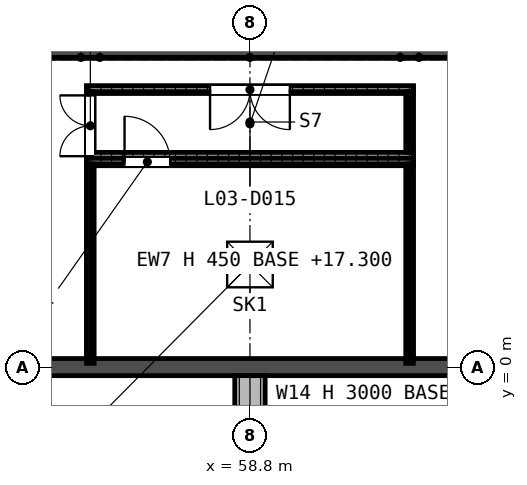
"""IFC4 building model, lengths in metres.
Left out: names, types, materials, properties, quantities, classifications, styles, units other than length and angle.
Written with IfcOpenShell. Run it as: python <this file> out.ifc"""

import sys

from ifc_helpers import new_model, si_unit, direction, frame, frame_2d, origin, origin_2d, place, context, subcontext, project, spatial, polyline, rectangle, outline, extrude, element, fill, save


model = new_model("IFC4")
c1 = context("Model", 3, precision=1e-05, world=origin(), true_north=direction((0.0, 1.0)))
c2 = subcontext(c1, "Body", "Model", "MODEL_VIEW")
j1 = project(units=[si_unit("LENGTHUNIT", "METRE"), si_unit("PLANEANGLEUNIT", "RADIAN")], contexts=[c1])
p1 = place(None, origin())
s1 = spatial("IfcSite", under=j1, at=p1, CompositionType="ELEMENT")
p2 = place(p1, origin())
s2 = spatial("IfcBuilding", under=s1, at=p2, CompositionType="ELEMENT")
p3 = place(p2, frame((0.0, 0.0, 14.4)))
s3 = spatial("IfcBuildingStorey", under=s2, at=p3, CompositionType="ELEMENT", Elevation=14.4)
p4 = place(p3, frame((0.0, 0.0, -0.3), z_axis=(0.0, 0.0, 1.0), x_axis=(1.0, 0.0, 0.0)))
e1 = element("IfcWall", 1, at=p4, inside=s3, PredefinedType="SOLIDWALL", context=c2, shape_type="SweptSolid", body=[
    extrude(rectangle(XDim=168.0, YDim=0.45, at=frame_2d((84.0, 0.0))), origin(), (0.0, 0.0, 1.0), 3.3),
])
p5 = place(p3, frame((42.0, 8.4, -0.3), z_axis=(0.0, 0.0, 1.0), x_axis=(1.0, 0.0, 0.0)))
e2 = element("IfcWall", 2, at=p5, inside=s3, PredefinedType="SHEAR", context=c2, shape_type="SweptSolid", body=[
    extrude(outline(polyline([(0.0, 0.0), (42.0, 0.0), (42.0, 0.05), (41.807, 0.05), (39.368, 3.65), (36.232, 3.65), (33.793, 0.05), (33.6, 0.05), (33.407, 0.05), (30.968, 3.65), (27.832, 3.65), (25.393, 0.05), (25.2, 0.05), (25.007, 0.05), (22.568, 3.65), (19.432, 3.65), (16.993, 0.05), (16.8, 0.05), (16.607, 0.05), (14.168, 3.65), (11.032, 3.65), (8.593, 0.05), (8.4, 0.05), (8.207, 0.05), (5.768, 3.65), (2.632, 3.65), (0.193, 0.05), (0.0, 0.05), (0.0, 0.0)])), frame((0.0, 0.25, 0.0), z_axis=(0.0, -1.0, 0.0), x_axis=(1.0, 0.0, 0.0)), (0.0, 0.0, 1.0), 0.5),
])
p6 = place(p3, frame((54.5, 5.4, -0.3), z_axis=(0.0, 0.0, 1.0), x_axis=(1.0, 0.0, 0.0)))
e3 = element("IfcWall", 3, at=p6, inside=s3, PredefinedType="SHEAR", context=c2, shape_type="SweptSolid", body=[
    extrude(rectangle(XDim=8.6, YDim=0.2, at=frame_2d((4.3, 0.0))), origin(), (0.0, 0.0, 1.0), 3.0),
])
p7 = place(p6, frame((1.0, 0.0, 0.3)))
e4 = element("IfcOpeningElement", 4, at=p7, cuts=e3, PredefinedType="OPENING", context=c2, shape_type="SweptSolid", body=[
    extrude(rectangle(XDim=1.2, YDim=2.2, at=frame_2d((0.6, 1.1))), frame((0.0, 0.11, 0.0), z_axis=(0.0, -1.0, 0.0), x_axis=(1.0, 0.0, 0.0)), (0.0, 0.0, 1.0), 0.22),
])
for number, where, z_axis, x_axis in (
    (5, (54.6, 0.1, -0.3), (0.0, 0.0, 1.0), (0.0, 1.0, 0.0)),
    (6, (63.0, 0.1, -0.3), (0.0, 0.0, 1.0), (0.0, 1.0, 0.0)),
):
    element("IfcWall", number, at=place(p3, frame(where, z_axis=z_axis, x_axis=x_axis)), inside=s3, PredefinedType="SHEAR", context=c2, shape_type="SweptSolid", body=[
        extrude(rectangle(XDim=5.2, YDim=0.2, at=frame_2d((2.6, 0.0))), origin(), (0.0, 0.0, 1.0), 3.0),
    ])
p8 = place(p3, frame((54.6, 5.4, -0.3), z_axis=(0.0, 0.0, 1.0), x_axis=(0.0, 1.0, 0.0)))
e7 = element("IfcWall", 7, at=p8, inside=s3, PredefinedType="SHEAR", context=c2, shape_type="SweptSolid", body=[
    extrude(rectangle(XDim=1.9, YDim=0.2, at=frame_2d((0.95, 0.0))), origin(), (0.0, 0.0, 1.0), 3.0),
])
p9 = place(p8, frame((0.15, 0.0, 0.3)))
e8 = element("IfcOpeningElement", 8, at=p9, cuts=e7, PredefinedType="OPENING", context=c2, shape_type="SweptSolid", body=[
    extrude(rectangle(XDim=1.6, YDim=2.2, at=frame_2d((0.8, 1.1))), frame((0.0, 0.11, 0.0), z_axis=(0.0, -1.0, 0.0), x_axis=(1.0, 0.0, 0.0)), (0.0, 0.0, 1.0), 0.22),
])
p10 = place(p3, frame((63.0, 5.4, -0.3), z_axis=(0.0, 0.0, 1.0), x_axis=(0.0, 1.0, 0.0)))
e9 = element("IfcWall", 9, at=p10, inside=s3, PredefinedType="SHEAR", context=c2, shape_type="SweptSolid", body=[
    extrude(rectangle(XDim=1.9, YDim=0.2, at=frame_2d((0.95, 0.0))), origin(), (0.0, 0.0, 1.0), 3.0),
])
p11 = place(p3, frame((54.5, 7.3, -0.3), z_axis=(0.0, 0.0, 1.0), x_axis=(1.0, 0.0, 0.0)))
e10 = element("IfcWall", 10, at=p11, inside=s3, PredefinedType="SHEAR", context=c2, shape_type="SweptSolid", body=[
    extrude(rectangle(XDim=8.6, YDim=0.2, at=frame_2d((4.3, 0.0))), origin(), (0.0, 0.0, 1.0), 3.0),
])
p12 = place(p11, frame((3.25, 0.0, 0.3)))
e11 = element("IfcOpeningElement", 11, at=p12, cuts=e10, PredefinedType="OPENING", context=c2, shape_type="SweptSolid", body=[
    extrude(rectangle(XDim=2.1, YDim=2.2, at=frame_2d((1.05, 1.1))), frame((0.0, 0.11, 0.0), z_axis=(0.0, -1.0, 0.0), x_axis=(1.0, 0.0, 0.0)), (0.0, 0.0, 1.0), 0.22),
])
p13 = place(p3, frame((54.5, 5.425, 2.9), z_axis=(0.0, 0.0, 1.0), x_axis=(1.0, 0.0, 0.0)))
e12 = element("IfcWall", 12, at=p13, inside=s3, PredefinedType="PARAPET", context=c2, shape_type="SweptSolid", body=[
    extrude(rectangle(XDim=8.6, YDim=0.15, at=frame_2d((4.3, 0.0))), origin(), (0.0, 0.0, 1.0), 0.45),
])
for number, where, z_axis, x_axis in (
    (13, (54.575, 0.225, 2.9), (0.0, 0.0, 1.0), (0.0, 1.0, 0.0)),
    (14, (63.025, 0.225, 2.9), (0.0, 0.0, 1.0), (0.0, 1.0, 0.0)),
):
    element("IfcWall", number, at=place(p3, frame(where, z_axis=z_axis, x_axis=x_axis)), inside=s3, PredefinedType="PARAPET", context=c2, shape_type="SweptSolid", body=[
        extrude(rectangle(XDim=5.125, YDim=0.15, at=frame_2d((2.562, 0.0))), origin(), (0.0, 0.0, 1.0), 0.45),
    ])
for number, where, z_axis, x_axis in (
    (15, (54.5, 5.575, 2.9), (0.0, 0.0, 1.0), (1.0, 0.0, 0.0)),
    (16, (54.5, 7.325, 2.9), (0.0, 0.0, 1.0), (1.0, 0.0, 0.0)),
):
    element("IfcWall", number, at=place(p3, frame(where, z_axis=z_axis, x_axis=x_axis)), inside=s3, PredefinedType="PARAPET", context=c2, shape_type="SweptSolid", body=[
        extrude(rectangle(XDim=8.6, YDim=0.15, at=frame_2d((4.3, 0.0))), origin(), (0.0, 0.0, 1.0), 0.45),
    ])
for number, where, z_axis, x_axis in (
    (17, (54.575, 5.65, 2.9), (0.0, 0.0, 1.0), (0.0, 1.0, 0.0)),
    (18, (63.025, 5.65, 2.9), (0.0, 0.0, 1.0), (0.0, 1.0, 0.0)),
):
    element("IfcWall", number, at=place(p3, frame(where, z_axis=z_axis, x_axis=x_axis)), inside=s3, PredefinedType="PARAPET", context=c2, shape_type="SweptSolid", body=[
        extrude(rectangle(XDim=1.6, YDim=0.15, at=frame_2d((0.8, 0.0))), origin(), (0.0, 0.0, 1.0), 0.45),
    ])
p14 = place(p3, frame((58.8, -0.225, -0.3), z_axis=(0.0, 0.0, 1.0), x_axis=(0.0, -1.0, 0.0)))
e19 = element("IfcWall", 19, at=p14, inside=s3, PredefinedType="SOLIDWALL", context=c2, shape_type="SweptSolid", body=[
    extrude(rectangle(XDim=0.9, YDim=0.8, at=frame_2d((0.45, 0.0))), origin(), (0.0, 0.0, 1.0), 3.3),
])
p15 = place(p12, origin())
e20 = element("IfcDoor", 20, at=p15, inside=s3, OperationType="DOUBLE_DOOR_SINGLE_SWING", PredefinedType="DOOR", context=c2, shape_type="SweptSolid", body=[
    extrude(rectangle(XDim=2.1, YDim=2.2, at=frame_2d((1.05, 1.1))), frame((0.0, 0.025, 0.0), z_axis=(0.0, -1.0, 0.0), x_axis=(1.0, 0.0, 0.0)), (0.0, 0.0, 1.0), 0.05),
])
fill(e11, e20)
p16 = place(p7, origin())
e21 = element("IfcDoor", 21, at=p16, inside=s3, OperationType="SINGLE_SWING_RIGHT", PredefinedType="DOOR", context=c2, shape_type="SweptSolid", body=[
    extrude(rectangle(XDim=1.2, YDim=2.2, at=frame_2d((0.6, 1.1))), frame((0.0, 0.025, 0.0), z_axis=(0.0, -1.0, 0.0), x_axis=(1.0, 0.0, 0.0)), (0.0, 0.0, 1.0), 0.05),
])
fill(e4, e21)
p17 = place(p3, frame((0.0, 0.0, 2.7)))
p18 = place(p17, frame((58.8, 2.7, 0.0)))
p19 = place(p18, frame((0.0, 0.0, 0.15)))
e22 = element("IfcWindow", 22, at=p19, inside=s3, PartitioningType="SINGLE_PANEL", PredefinedType="SKYLIGHT", context=c2, shape_type="SweptSolid", body=[
    extrude(rectangle(XDim=1.2, YDim=1.2, at=origin_2d()), origin(), (0.0, 0.0, 1.0), 0.05),
])
p20 = place(p9, origin())
e23 = element("IfcDoor", 23, at=p20, inside=s3, OperationType="DOUBLE_DOOR_SINGLE_SWING", PredefinedType="DOOR", context=c2, shape_type="SweptSolid", body=[
    extrude(rectangle(XDim=1.6, YDim=0.013, at=frame_2d((0.8, 0.007))), frame((0.0, 0.088, 0.0), z_axis=(0.0, -1.0, 0.0), x_axis=(1.0, 0.0, 0.0)), (0.0, 0.0, 1.0), 0.176),
    extrude(rectangle(XDim=0.075, YDim=2.112, at=frame_2d((0.038, 1.069))), frame((0.0, 0.098, 0.0), z_axis=(0.0, -1.0, 0.0), x_axis=(1.0, 0.0, 0.0)), (0.0, 0.0, 1.0), 0.196),
    extrude(rectangle(XDim=0.075, YDim=2.112, at=frame_2d((1.562, 1.069))), frame((0.0, 0.098, 0.0), z_axis=(0.0, -1.0, 0.0), x_axis=(1.0, 0.0, 0.0)), (0.0, 0.0, 1.0), 0.196),
    extrude(rectangle(XDim=1.6, YDim=0.075, at=frame_2d((0.8, 2.163))), frame((0.0, 0.088, 0.0), z_axis=(0.0, -1.0, 0.0), x_axis=(1.0, 0.0, 0.0)), (0.0, 0.0, 1.0), 0.176),
    extrude(rectangle(XDim=1.45, YDim=2.112, at=frame_2d((0.8, 1.069))), frame((0.0, 0.025, 0.0), z_axis=(0.0, -1.0, 0.0), x_axis=(1.0, 0.0, 0.0)), (0.0, 0.0, 1.0), 0.05),
])
fill(e8, e23)
save(model, sys.argv[1])
